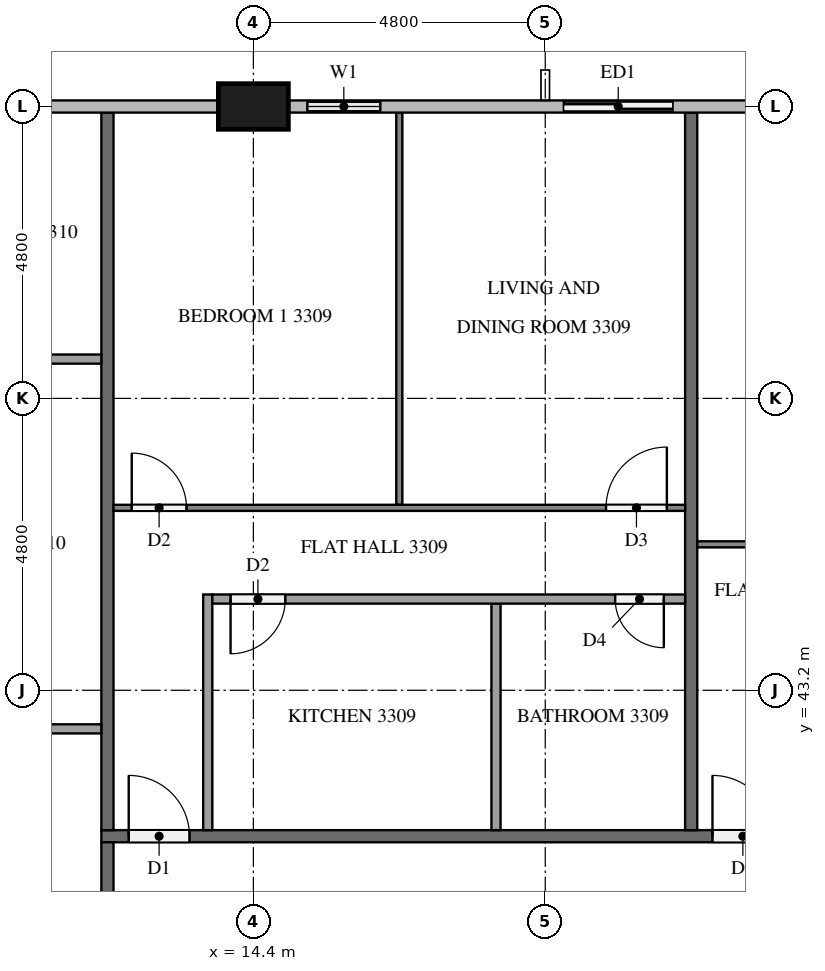
"""IFC4 building model, lengths in metres.
Left out: names, types, materials, properties, quantities, classifications, styles, units other than length and angle.
Written with IfcOpenShell. Run it as: python <this file> out.ifc"""

import sys

from ifc_helpers import new_model, si_unit, direction, frame, frame_2d, origin, origin_2d, place, context, subcontext, project, spatial, rectangle, extrude, element, fill, save


model = new_model("IFC4")
c1 = context("Model", 3, precision=1e-05, world=origin(), true_north=direction((0.0, 1.0)))
c2 = subcontext(c1, "Body", "Model", "MODEL_VIEW")
j1 = project(units=[si_unit("LENGTHUNIT", "METRE"), si_unit("PLANEANGLEUNIT", "RADIAN")], contexts=[c1])
p1 = place(None, origin())
s1 = spatial("IfcSite", under=j1, at=p1, CompositionType="ELEMENT")
p2 = place(p1, origin())
s2 = spatial("IfcBuilding", under=s1, at=p2, CompositionType="ELEMENT")
p3 = place(p2, frame((0.0, 0.0, 129.6)))
s3 = spatial("IfcBuildingStorey", under=s2, at=p3, CompositionType="ELEMENT", Elevation=129.6)
p4 = place(p3, frame((14.4, 52.8, 0.0), z_axis=(0.0, 0.0, 1.0), x_axis=(1.0, 0.0, 0.0)))
e1 = element("IfcColumn", 1, at=p4, inside=s3, PredefinedType="COLUMN", context=c2, shape_type="SweptSolid", body=[
    extrude(rectangle(XDim=1.15, YDim=0.75, at=origin_2d()), origin(), (0.0, 0.0, 1.0), 3.2),
])
p5 = place(p3, frame((21.6, 52.8, 0.0), z_axis=(0.0, 0.0, 1.0), x_axis=(-1.0, 0.0, 0.0)))
e2 = element("IfcWall", 2, at=p5, inside=s3, PredefinedType="SOLIDWALL", context=c2, shape_type="SweptSolid", body=[
    extrude(rectangle(XDim=2.4, YDim=0.15, at=frame_2d((1.2, 0.0))), origin(), (0.0, 0.0, 1.0), 3.2),
])
p6 = place(p5, frame((0.3, 0.0, 0.0)))
e3 = element("IfcOpeningElement", 3, at=p6, cuts=e2, PredefinedType="OPENING", context=c2, shape_type="SweptSolid", body=[
    extrude(rectangle(XDim=1.8, YDim=2.4, at=frame_2d((0.9, 1.2))), frame((0.0, 0.085, 0.0), z_axis=(0.0, -1.0, 0.0), x_axis=(1.0, 0.0, 0.0)), (0.0, 0.0, 1.0), 0.17),
])
p7 = place(p3, frame((16.8, 52.8, 0.0), z_axis=(0.0, 0.0, 1.0), x_axis=(-1.0, 0.0, 0.0)))
e4 = element("IfcWall", 4, at=p7, inside=s3, PredefinedType="SOLIDWALL", context=c2, shape_type="SweptSolid", body=[
    extrude(rectangle(XDim=1.825, YDim=0.15, at=frame_2d((0.913, 0.0))), origin(), (0.0, 0.0, 1.0), 3.2),
])
p8 = place(p7, frame((0.312, 0.0, 0.9)))
e5 = element("IfcOpeningElement", 5, at=p8, cuts=e4, PredefinedType="OPENING", context=c2, shape_type="SweptSolid", body=[
    extrude(rectangle(XDim=1.2, YDim=1.4, at=frame_2d((0.6, 0.7))), frame((0.0, 0.085, 0.0), z_axis=(0.0, -1.0, 0.0), x_axis=(1.0, 0.0, 0.0)), (0.0, 0.0, 1.0), 0.17),
])
p9 = place(p3, frame((11.9, 40.8, 0.0), z_axis=(0.0, 0.0, 1.0), x_axis=(1.0, 0.0, 0.0)))
e6 = element("IfcWall", 6, at=p9, inside=s3, PredefinedType="PARTITIONING", context=c2, shape_type="SweptSolid", body=[
    extrude(rectangle(XDim=38.6, YDim=0.2, at=frame_2d((19.3, 0.0))), origin(), (0.0, 0.0, 1.0), 3.2),
])
p10 = place(p9, frame((37.15, 0.0, 0.0)))
e7 = element("IfcOpeningElement", 7, at=p10, cuts=e6, PredefinedType="OPENING", context=c2, shape_type="SweptSolid", body=[
    extrude(rectangle(XDim=1.0, YDim=2.1, at=frame_2d((0.5, 1.05))), frame((0.0, 0.11, 0.0), z_axis=(0.0, -1.0, 0.0), x_axis=(1.0, 0.0, 0.0)), (0.0, 0.0, 1.0), 0.22),
])
p11 = place(p9, frame((10.05, 0.0, 0.0)))
e8 = element("IfcOpeningElement", 8, at=p11, cuts=e6, PredefinedType="OPENING", context=c2, shape_type="SweptSolid", body=[
    extrude(rectangle(XDim=1.0, YDim=2.1, at=frame_2d((0.5, 1.05))), frame((0.0, 0.11, 0.0), z_axis=(0.0, -1.0, 0.0), x_axis=(1.0, 0.0, 0.0)), (0.0, 0.0, 1.0), 0.22),
])
p12 = place(p9, frame((0.45, 0.0, 0.0)))
e9 = element("IfcOpeningElement", 9, at=p12, cuts=e6, PredefinedType="OPENING", context=c2, shape_type="SweptSolid", body=[
    extrude(rectangle(XDim=1.0, YDim=2.1, at=frame_2d((0.5, 1.05))), frame((0.0, 0.11, 0.0), z_axis=(0.0, -1.0, 0.0), x_axis=(1.0, 0.0, 0.0)), (0.0, 0.0, 1.0), 0.22),
])
p13 = place(p3, frame((12.0, 37.9, 0.0), z_axis=(0.0, 0.0, 1.0), x_axis=(0.0, 1.0, 0.0)))
e10 = element("IfcWall", 10, at=p13, inside=s3, PredefinedType="PARTITIONING", context=c2, shape_type="SweptSolid", body=[
    extrude(rectangle(XDim=2.8, YDim=0.2, at=frame_2d((1.4, 0.0))), origin(), (0.0, 0.0, 1.0), 3.2),
])
p14 = place(p13, frame((0.25, 0.0, 0.0)))
e11 = element("IfcOpeningElement", 11, at=p14, cuts=e10, PredefinedType="OPENING", context=c2, shape_type="SweptSolid", body=[
    extrude(rectangle(XDim=1.0, YDim=2.1, at=frame_2d((0.5, 1.05))), frame((0.0, 0.11, 0.0), z_axis=(0.0, -1.0, 0.0), x_axis=(1.0, 0.0, 0.0)), (0.0, 0.0, 1.0), 0.22),
])
for number, where, z_axis, x_axis in (
    (12, (21.6, 52.7, 0.0), (0.0, 0.0, 1.0), (0.0, -1.0, 0.0)),
    (13, (12.0, 52.7, 0.0), (0.0, 0.0, 1.0), (0.0, -1.0, 0.0)),
):
    element("IfcWall", number, at=place(p3, frame(where, z_axis=z_axis, x_axis=x_axis)), inside=s3, PredefinedType="PARTITIONING", context=c2, shape_type="SweptSolid", body=[
        extrude(rectangle(XDim=11.8, YDim=0.2, at=frame_2d((5.9, 0.0))), origin(), (0.0, 0.0, 1.0), 3.2),
    ])
p15 = place(p3, frame((21.7, 45.6, 0.0), z_axis=(0.0, 0.0, 1.0), x_axis=(1.0, 0.0, 0.0)))
e14 = element("IfcWall", 14, at=p15, inside=s3, PredefinedType="PARTITIONING", context=c2, shape_type="SweptSolid", body=[
    extrude(rectangle(XDim=14.2, YDim=0.1, at=frame_2d((7.1, 0.0))), origin(), (0.0, 0.0, 1.0), 3.2),
])
p16 = place(p15, frame((3.45, 0.0, 0.0)))
e15 = element("IfcOpeningElement", 15, at=p16, cuts=e14, PredefinedType="OPENING", context=c2, shape_type="SweptSolid", body=[
    extrude(rectangle(XDim=0.9, YDim=2.1, at=frame_2d((0.45, 1.05))), frame((0.0, 0.06, 0.0), z_axis=(0.0, -1.0, 0.0), x_axis=(1.0, 0.0, 0.0)), (0.0, 0.0, 1.0), 0.12),
])
p17 = place(p15, frame((5.05, 0.0, 0.0)))
e16 = element("IfcOpeningElement", 16, at=p17, cuts=e14, PredefinedType="OPENING", context=c2, shape_type="SweptSolid", body=[
    extrude(rectangle(XDim=0.9, YDim=2.1, at=frame_2d((0.45, 1.05))), frame((0.0, 0.06, 0.0), z_axis=(0.0, -1.0, 0.0), x_axis=(1.0, 0.0, 0.0)), (0.0, 0.0, 1.0), 0.12),
])
p18 = place(p15, frame((12.9, 0.0, 0.0)))
e17 = element("IfcOpeningElement", 17, at=p18, cuts=e14, PredefinedType="OPENING", context=c2, shape_type="SweptSolid", body=[
    extrude(rectangle(XDim=1.0, YDim=2.1, at=frame_2d((0.5, 1.05))), frame((0.0, 0.06, 0.0), z_axis=(0.0, -1.0, 0.0), x_axis=(1.0, 0.0, 0.0)), (0.0, 0.0, 1.0), 0.12),
])
p19 = place(p3, frame((16.8, 46.25, 0.0), z_axis=(0.0, 0.0, 1.0), x_axis=(0.0, 1.0, 0.0)))
e18 = element("IfcWall", 18, at=p19, inside=s3, PredefinedType="PARTITIONING", context=c2, shape_type="SweptSolid", body=[
    extrude(rectangle(XDim=6.45, YDim=0.1, at=frame_2d((3.225, 0.0))), origin(), (0.0, 0.0, 1.0), 3.2),
])
p20 = place(p3, frame((12.1, 46.2, 0.0), z_axis=(0.0, 0.0, 1.0), x_axis=(1.0, 0.0, 0.0)))
e19 = element("IfcWall", 19, at=p20, inside=s3, PredefinedType="PARTITIONING", context=c2, shape_type="SweptSolid", body=[
    extrude(rectangle(XDim=9.4, YDim=0.1, at=frame_2d((4.7, 0.0))), origin(), (0.0, 0.0, 1.0), 3.2),
])
p21 = place(p20, frame((0.3, 0.0, 0.0)))
e20 = element("IfcOpeningElement", 20, at=p21, cuts=e19, PredefinedType="OPENING", context=c2, shape_type="SweptSolid", body=[
    extrude(rectangle(XDim=0.9, YDim=2.1, at=frame_2d((0.45, 1.05))), frame((0.0, 0.06, 0.0), z_axis=(0.0, -1.0, 0.0), x_axis=(1.0, 0.0, 0.0)), (0.0, 0.0, 1.0), 0.12),
])
p22 = place(p20, frame((8.1, 0.0, 0.0)))
e21 = element("IfcOpeningElement", 21, at=p22, cuts=e19, PredefinedType="OPENING", context=c2, shape_type="SweptSolid", body=[
    extrude(rectangle(XDim=1.0, YDim=2.1, at=frame_2d((0.5, 1.05))), frame((0.0, 0.06, 0.0), z_axis=(0.0, -1.0, 0.0), x_axis=(1.0, 0.0, 0.0)), (0.0, 0.0, 1.0), 0.12),
])
p23 = place(p3, frame((18.39, 40.9, 0.0), z_axis=(0.0, 0.0, 1.0), x_axis=(0.0, 1.0, 0.0)))
e22 = element("IfcWall", 22, at=p23, inside=s3, PredefinedType="PARTITIONING", context=c2, shape_type="SweptSolid", body=[
    extrude(rectangle(XDim=3.725, YDim=0.15, at=frame_2d((1.863, 0.0))), origin(), (0.0, 0.0, 1.0), 3.2),
])
p24 = place(p3, frame((13.65, 40.9, 0.0), z_axis=(0.0, 0.0, 1.0), x_axis=(0.0, 1.0, 0.0)))
e23 = element("IfcWall", 23, at=p24, inside=s3, PredefinedType="PARTITIONING", context=c2, shape_type="SweptSolid", body=[
    extrude(rectangle(XDim=3.875, YDim=0.15, at=frame_2d((1.938, 0.0))), origin(), (0.0, 0.0, 1.0), 3.2),
])
p25 = place(p3, frame((21.5, 44.7, 0.0), z_axis=(0.0, 0.0, 1.0), x_axis=(-1.0, 0.0, 0.0)))
e24 = element("IfcWall", 24, at=p25, inside=s3, PredefinedType="PARTITIONING", context=c2, shape_type="SweptSolid", body=[
    extrude(rectangle(XDim=7.775, YDim=0.15, at=frame_2d((3.887, 0.0))), origin(), (0.0, 0.0, 1.0), 3.2),
])
p26 = place(p25, frame((6.575, 0.0, 0.0)))
e25 = element("IfcOpeningElement", 25, at=p26, cuts=e24, PredefinedType="OPENING", context=c2, shape_type="SweptSolid", body=[
    extrude(rectangle(XDim=0.9, YDim=2.1, at=frame_2d((0.45, 1.05))), frame((0.0, 0.085, 0.0), z_axis=(0.0, -1.0, 0.0), x_axis=(1.0, 0.0, 0.0)), (0.0, 0.0, 1.0), 0.17),
])
p27 = place(p25, frame((0.35, 0.0, 0.0)))
e26 = element("IfcOpeningElement", 26, at=p27, cuts=e24, PredefinedType="OPENING", context=c2, shape_type="SweptSolid", body=[
    extrude(rectangle(XDim=0.8, YDim=2.1, at=frame_2d((0.4, 1.05))), frame((0.0, 0.085, 0.0), z_axis=(0.0, -1.0, 0.0), x_axis=(1.0, 0.0, 0.0)), (0.0, 0.0, 1.0), 0.17),
])
for number, where, z_axis, x_axis in (
    (27, (11.9, 42.565, 0.0), (0.0, 0.0, 1.0), (-1.0, 0.0, 0.0)),
    (28, (11.9, 48.646, 0.0), (0.0, 0.0, 1.0), (-1.0, 0.0, 0.0)),
):
    element("IfcWall", number, at=place(p3, frame(where, z_axis=z_axis, x_axis=x_axis)), inside=s3, PredefinedType="PARTITIONING", context=c2, shape_type="SweptSolid", body=[
        extrude(rectangle(XDim=3.275, YDim=0.15, at=frame_2d((1.637, 0.0))), origin(), (0.0, 0.0, 1.0), 3.2),
    ])
p28 = place(p6, origin())
e29 = element("IfcDoor", 29, at=p28, inside=s3, OperationType="SLIDING_TO_RIGHT", PredefinedType="DOOR", context=c2, shape_type="SweptSolid", body=[
    extrude(rectangle(XDim=1.8, YDim=2.4, at=frame_2d((0.9, 1.2))), frame((0.0, 0.025, 0.0), z_axis=(0.0, -1.0, 0.0), x_axis=(1.0, 0.0, 0.0)), (0.0, 0.0, 1.0), 0.05),
])
fill(e3, e29)
p29 = place(p8, origin())
e30 = element("IfcWindow", 30, at=p29, inside=s3, PartitioningType="SINGLE_PANEL", PredefinedType="WINDOW", context=c2, shape_type="SweptSolid", body=[
    extrude(rectangle(XDim=1.2, YDim=1.4, at=frame_2d((0.6, 0.7))), frame((0.0, 0.03, 0.0), z_axis=(0.0, -1.0, 0.0), x_axis=(1.0, 0.0, 0.0)), (0.0, 0.0, 1.0), 0.06),
])
fill(e5, e30)
p30 = place(p11, origin())
e31 = element("IfcDoor", 31, at=p30, inside=s3, OperationType="SINGLE_SWING_LEFT", PredefinedType="DOOR", context=c2, shape_type="SweptSolid", body=[
    extrude(rectangle(XDim=1.0, YDim=2.1, at=frame_2d((0.5, 1.05))), frame((0.0, 0.025, 0.0), z_axis=(0.0, -1.0, 0.0), x_axis=(1.0, 0.0, 0.0)), (0.0, 0.0, 1.0), 0.05),
])
fill(e8, e31)
p31 = place(p12, origin())
e32 = element("IfcDoor", 32, at=p31, inside=s3, OperationType="SINGLE_SWING_LEFT", PredefinedType="DOOR", context=c2, shape_type="SweptSolid", body=[
    extrude(rectangle(XDim=1.0, YDim=2.1, at=frame_2d((0.5, 1.05))), frame((0.0, 0.025, 0.0), z_axis=(0.0, -1.0, 0.0), x_axis=(1.0, 0.0, 0.0)), (0.0, 0.0, 1.0), 0.05),
])
fill(e9, e32)
p32 = place(p21, origin())
e33 = element("IfcDoor", 33, at=p32, inside=s3, OperationType="SINGLE_SWING_LEFT", PredefinedType="DOOR", context=c2, shape_type="SweptSolid", body=[
    extrude(rectangle(XDim=0.9, YDim=2.1, at=frame_2d((0.45, 1.05))), frame((0.0, 0.025, 0.0), z_axis=(0.0, -1.0, 0.0), x_axis=(1.0, 0.0, 0.0)), (0.0, 0.0, 1.0), 0.05),
])
fill(e20, e33)
p33 = place(p22, origin())
e34 = element("IfcDoor", 34, at=p33, inside=s3, OperationType="SINGLE_SWING_RIGHT", PredefinedType="DOOR", context=c2, shape_type="SweptSolid", body=[
    extrude(rectangle(XDim=1.0, YDim=2.1, at=frame_2d((0.5, 1.05))), frame((0.0, 0.025, 0.0), z_axis=(0.0, -1.0, 0.0), x_axis=(1.0, 0.0, 0.0)), (0.0, 0.0, 1.0), 0.05),
])
fill(e21, e34)
p34 = place(p26, origin())
e35 = element("IfcDoor", 35, at=p34, inside=s3, OperationType="SINGLE_SWING_RIGHT", PredefinedType="DOOR", context=c2, shape_type="SweptSolid", body=[
    extrude(rectangle(XDim=0.9, YDim=2.1, at=frame_2d((0.45, 1.05))), frame((0.0, 0.025, 0.0), z_axis=(0.0, -1.0, 0.0), x_axis=(1.0, 0.0, 0.0)), (0.0, 0.0, 1.0), 0.05),
])
fill(e25, e35)
p35 = place(p27, origin())
e36 = element("IfcDoor", 36, at=p35, inside=s3, OperationType="SINGLE_SWING_LEFT", PredefinedType="DOOR", context=c2, shape_type="SweptSolid", body=[
    extrude(rectangle(XDim=0.8, YDim=2.1, at=frame_2d((0.4, 1.05))), frame((0.0, 0.025, 0.0), z_axis=(0.0, -1.0, 0.0), x_axis=(1.0, 0.0, 0.0)), (0.0, 0.0, 1.0), 0.05),
])
fill(e26, e36)
save(model, sys.argv[1])
